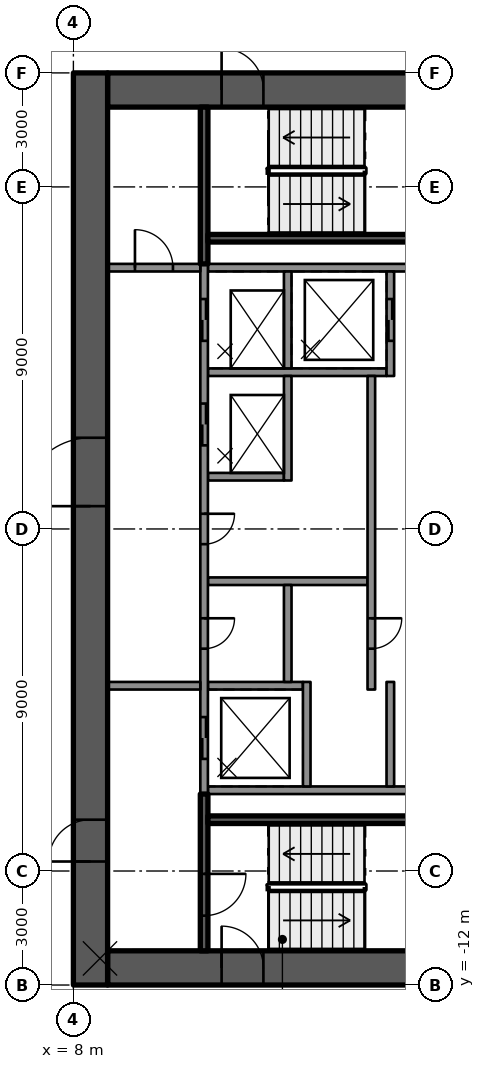
"""IFC4 building model, lengths in metres.
Left out: names, types, materials, properties, quantities, classifications, styles, units other than length and angle.
Written with IfcOpenShell. Run it as: python <this file> out.ifc"""

import sys

from ifc_helpers import new_model, si_unit, direction, frame, frame_2d, origin, place, context, subcontext, project, spatial, rectangle, extrude, element, fill, save


model = new_model("IFC4")
c1 = context("Model", 3, precision=1e-05, world=origin(), true_north=direction((0.0, 1.0)))
c2 = subcontext(c1, "Body", "Model", "MODEL_VIEW")
j1 = project(units=[si_unit("LENGTHUNIT", "METRE"), si_unit("PLANEANGLEUNIT", "RADIAN")], contexts=[c1])
p1 = place(None, origin())
s1 = spatial("IfcSite", under=j1, at=p1, CompositionType="ELEMENT")
p2 = place(p1, origin())
s2 = spatial("IfcBuilding", under=s1, at=p2, CompositionType="ELEMENT")
p3 = place(p2, frame((0.0, 0.0, 278.9)))
s3 = spatial("IfcBuildingStorey", under=s2, at=p3, CompositionType="ELEMENT", Elevation=278.9)
p4 = place(p3, frame((8.9, 11.55, 0.0), z_axis=(0.0, 0.0, 1.0), x_axis=(1.0, 0.0, 0.0)))
e1 = element("IfcWall", 1, at=p4, inside=s3, PredefinedType="SHEAR", context=c2, shape_type="SweptSolid", body=[
    extrude(rectangle(XDim=9.2, YDim=0.9, at=frame_2d((4.6, 0.0))), origin(), (0.0, 0.0, 1.0), 3.5),
])
p5 = place(p4, frame((3.0, 0.0, 0.0)))
e2 = element("IfcOpeningElement", 2, at=p5, cuts=e1, PredefinedType="OPENING", context=c2, shape_type="SweptSolid", body=[
    extrude(rectangle(XDim=1.1, YDim=2.1, at=frame_2d((0.55, 1.05))), frame((0.0, 0.46, 0.0), z_axis=(0.0, -1.0, 0.0), x_axis=(1.0, 0.0, 0.0)), (0.0, 0.0, 1.0), 0.92),
])
p6 = place(p3, frame((8.9, -11.55, 0.0), z_axis=(0.0, 0.0, 1.0), x_axis=(1.0, 0.0, 0.0)))
e3 = element("IfcWall", 3, at=p6, inside=s3, PredefinedType="SHEAR", context=c2, shape_type="SweptSolid", body=[
    extrude(rectangle(XDim=9.2, YDim=0.9, at=frame_2d((4.6, 0.0))), origin(), (0.0, 0.0, 1.0), 3.5),
])
p7 = place(p6, frame((3.0, 0.0, 0.0)))
e4 = element("IfcOpeningElement", 4, at=p7, cuts=e3, PredefinedType="OPENING", context=c2, shape_type="SweptSolid", body=[
    extrude(rectangle(XDim=1.1, YDim=2.1, at=frame_2d((0.55, 1.05))), frame((0.0, 0.46, 0.0), z_axis=(0.0, -1.0, 0.0), x_axis=(1.0, 0.0, 0.0)), (0.0, 0.0, 1.0), 0.92),
])
p8 = place(p3, frame((8.45, -12.0, 0.0), z_axis=(0.0, 0.0, 1.0), x_axis=(0.0, 1.0, 0.0)))
e5 = element("IfcWall", 5, at=p8, inside=s3, PredefinedType="SHEAR", context=c2, shape_type="SweptSolid", body=[
    extrude(rectangle(XDim=24.0, YDim=0.9, at=frame_2d((12.0, 0.0))), origin(), (0.0, 0.0, 1.0), 3.5),
])
p9 = place(p8, frame((12.6, 0.0, 0.0)))
e6 = element("IfcOpeningElement", 6, at=p9, cuts=e5, PredefinedType="OPENING", context=c2, shape_type="SweptSolid", body=[
    extrude(rectangle(XDim=1.8, YDim=2.1, at=frame_2d((0.9, 1.05))), frame((0.0, 0.46, 0.0), z_axis=(0.0, -1.0, 0.0), x_axis=(1.0, 0.0, 0.0)), (0.0, 0.0, 1.0), 0.92),
])
p10 = place(p8, frame((3.25, 0.0, 0.0)))
e7 = element("IfcOpeningElement", 7, at=p10, cuts=e5, PredefinedType="OPENING", context=c2, shape_type="SweptSolid", body=[
    extrude(rectangle(XDim=1.1, YDim=2.1, at=frame_2d((0.55, 1.05))), frame((0.0, 0.46, 0.0), z_axis=(0.0, -1.0, 0.0), x_axis=(1.0, 0.0, 0.0)), (0.0, 0.0, 1.0), 0.92),
])
for number, where, z_axis, x_axis in (
    (8, (11.54, -6.875, 0.0), (0.0, 0.0, 1.0), (1.0, 0.0, 0.0)),
    (9, (11.54, 6.875, 0.0), (0.0, 0.0, 1.0), (1.0, 0.0, 0.0)),
):
    element("IfcWall", number, at=place(p3, frame(where, z_axis=z_axis, x_axis=x_axis)), inside=s3, PredefinedType="SOLIDWALL", context=c2, shape_type="SweptSolid", body=[
        extrude(rectangle(XDim=6.56, YDim=0.2, at=frame_2d((3.28, 0.0))), origin(), (0.0, 0.0, 1.0), 3.09),
    ])
p11 = place(p3, frame((11.54, 4.125, 0.0), z_axis=(0.0, 0.0, 1.0), x_axis=(1.0, 0.0, 0.0)))
e10 = element("IfcWall", 10, at=p11, inside=s3, PredefinedType="SOLIDWALL", context=c2, shape_type="SweptSolid", body=[
    extrude(rectangle(XDim=4.7, YDim=0.2, at=frame_2d((2.35, 0.0))), origin(), (0.0, 0.0, 1.0), 3.09),
])
p12 = place(p3, frame((11.54, 1.375, 0.0), z_axis=(0.0, 0.0, 1.0), x_axis=(1.0, 0.0, 0.0)))
e11 = element("IfcWall", 11, at=p12, inside=s3, PredefinedType="SOLIDWALL", context=c2, shape_type="SweptSolid", body=[
    extrude(rectangle(XDim=2.0, YDim=0.2, at=frame_2d((1.0, 0.0))), origin(), (0.0, 0.0, 1.0), 3.09),
])
p13 = place(p3, frame((11.54, -1.375, 0.0), z_axis=(0.0, 0.0, 1.0), x_axis=(1.0, 0.0, 0.0)))
e12 = element("IfcWall", 12, at=p13, inside=s3, PredefinedType="SOLIDWALL", context=c2, shape_type="SweptSolid", body=[
    extrude(rectangle(XDim=4.2, YDim=0.2, at=frame_2d((2.1, 0.0))), origin(), (0.0, 0.0, 1.0), 3.09),
])
p14 = place(p3, frame((11.54, -4.125, 0.0), z_axis=(0.0, 0.0, 1.0), x_axis=(1.0, 0.0, 0.0)))
e13 = element("IfcWall", 13, at=p14, inside=s3, PredefinedType="SOLIDWALL", context=c2, shape_type="SweptSolid", body=[
    extrude(rectangle(XDim=2.5, YDim=0.2, at=frame_2d((1.25, 0.0))), origin(), (0.0, 0.0, 1.0), 3.09),
])
p15 = place(p3, frame((11.44, 6.975, 0.0), z_axis=(0.0, 0.0, 1.0), x_axis=(0.0, -1.0, 0.0)))
e14 = element("IfcWall", 14, at=p15, inside=s3, PredefinedType="SOLIDWALL", context=c2, shape_type="SweptSolid", body=[
    extrude(rectangle(XDim=13.95, YDim=0.2, at=frame_2d((6.975, 0.0))), origin(), (0.0, 0.0, 1.0), 3.09),
])
p16 = place(p15, frame((0.925, 0.0, 0.0)))
e15 = element("IfcOpeningElement", 15, at=p16, cuts=e14, PredefinedType="OPENING", context=c2, shape_type="SweptSolid", body=[
    extrude(rectangle(XDim=1.1, YDim=2.1, at=frame_2d((0.55, 1.05))), frame((0.0, 0.11, 0.0), z_axis=(0.0, -1.0, 0.0), x_axis=(1.0, 0.0, 0.0)), (0.0, 0.0, 1.0), 0.22),
])
p17 = place(p15, frame((3.675, 0.0, 0.0)))
e16 = element("IfcOpeningElement", 16, at=p17, cuts=e14, PredefinedType="OPENING", context=c2, shape_type="SweptSolid", body=[
    extrude(rectangle(XDim=1.1, YDim=2.1, at=frame_2d((0.55, 1.05))), frame((0.0, 0.11, 0.0), z_axis=(0.0, -1.0, 0.0), x_axis=(1.0, 0.0, 0.0)), (0.0, 0.0, 1.0), 0.22),
])
p18 = place(p15, frame((11.925, 0.0, 0.0)))
e17 = element("IfcOpeningElement", 17, at=p18, cuts=e14, PredefinedType="OPENING", context=c2, shape_type="SweptSolid", body=[
    extrude(rectangle(XDim=1.1, YDim=2.1, at=frame_2d((0.55, 1.05))), frame((0.0, 0.11, 0.0), z_axis=(0.0, -1.0, 0.0), x_axis=(1.0, 0.0, 0.0)), (0.0, 0.0, 1.0), 0.22),
])
p19 = place(p15, frame((6.575, 0.0, 0.0)))
e18 = element("IfcOpeningElement", 18, at=p19, cuts=e14, PredefinedType="OPENING", context=c2, shape_type="SweptSolid", body=[
    extrude(rectangle(XDim=0.8, YDim=2.1, at=frame_2d((0.4, 1.05))), frame((0.0, 0.11, 0.0), z_axis=(0.0, -1.0, 0.0), x_axis=(1.0, 0.0, 0.0)), (0.0, 0.0, 1.0), 0.22),
])
p20 = place(p15, frame((9.325, 0.0, 0.0)))
e19 = element("IfcOpeningElement", 19, at=p20, cuts=e14, PredefinedType="OPENING", context=c2, shape_type="SweptSolid", body=[
    extrude(rectangle(XDim=0.8, YDim=2.1, at=frame_2d((0.4, 1.05))), frame((0.0, 0.11, 0.0), z_axis=(0.0, -1.0, 0.0), x_axis=(1.0, 0.0, 0.0)), (0.0, 0.0, 1.0), 0.22),
])
p21 = place(p3, frame((13.64, 6.775, 0.0), z_axis=(0.0, 0.0, 1.0), x_axis=(0.0, -1.0, 0.0)))
e20 = element("IfcWall", 20, at=p21, inside=s3, PredefinedType="SOLIDWALL", context=c2, shape_type="SweptSolid", body=[
    extrude(rectangle(XDim=2.55, YDim=0.2, at=frame_2d((1.275, 0.0))), origin(), (0.0, 0.0, 1.0), 3.09),
])
p22 = place(p3, frame((13.64, 4.025, 0.0), z_axis=(0.0, 0.0, 1.0), x_axis=(0.0, -1.0, 0.0)))
e21 = element("IfcWall", 21, at=p22, inside=s3, PredefinedType="SOLIDWALL", context=c2, shape_type="SweptSolid", body=[
    extrude(rectangle(XDim=2.75, YDim=0.2, at=frame_2d((1.375, 0.0))), origin(), (0.0, 0.0, 1.0), 3.09),
])
p23 = place(p3, frame((13.64, -1.475, 0.0), z_axis=(0.0, 0.0, 1.0), x_axis=(0.0, -1.0, 0.0)))
e22 = element("IfcWall", 22, at=p23, inside=s3, PredefinedType="SOLIDWALL", context=c2, shape_type="SweptSolid", body=[
    extrude(rectangle(XDim=2.55, YDim=0.2, at=frame_2d((1.275, 0.0))), origin(), (0.0, 0.0, 1.0), 3.09),
])
p24 = place(p3, frame((14.14, -4.025, 0.0), z_axis=(0.0, 0.0, 1.0), x_axis=(0.0, -1.0, 0.0)))
e23 = element("IfcWall", 23, at=p24, inside=s3, PredefinedType="SOLIDWALL", context=c2, shape_type="SweptSolid", body=[
    extrude(rectangle(XDim=2.75, YDim=0.2, at=frame_2d((1.375, 0.0))), origin(), (0.0, 0.0, 1.0), 3.09),
])
p25 = place(p3, frame((16.34, 6.775, 0.0), z_axis=(0.0, 0.0, 1.0), x_axis=(0.0, -1.0, 0.0)))
e24 = element("IfcWall", 24, at=p25, inside=s3, PredefinedType="SOLIDWALL", context=c2, shape_type="SweptSolid", body=[
    extrude(rectangle(XDim=2.75, YDim=0.2, at=frame_2d((1.375, 0.0))), origin(), (0.0, 0.0, 1.0), 3.09),
])
p26 = place(p25, frame((0.725, 0.0, 0.0)))
e25 = element("IfcOpeningElement", 25, at=p26, cuts=e24, PredefinedType="OPENING", context=c2, shape_type="SweptSolid", body=[
    extrude(rectangle(XDim=1.1, YDim=2.1, at=frame_2d((0.55, 1.05))), frame((0.0, 0.11, 0.0), z_axis=(0.0, -1.0, 0.0), x_axis=(1.0, 0.0, 0.0)), (0.0, 0.0, 1.0), 0.22),
])
p27 = place(p3, frame((15.84, 4.025, 0.0), z_axis=(0.0, 0.0, 1.0), x_axis=(0.0, -1.0, 0.0)))
e26 = element("IfcWall", 26, at=p27, inside=s3, PredefinedType="SOLIDWALL", context=c2, shape_type="SweptSolid", body=[
    extrude(rectangle(XDim=8.25, YDim=0.2, at=frame_2d((4.125, 0.0))), origin(), (0.0, 0.0, 1.0), 3.09),
])
p28 = place(p27, frame((6.375, 0.0, 0.0)))
e27 = element("IfcOpeningElement", 27, at=p28, cuts=e26, PredefinedType="OPENING", context=c2, shape_type="SweptSolid", body=[
    extrude(rectangle(XDim=0.8, YDim=2.1, at=frame_2d((0.4, 1.05))), frame((0.0, 0.11, 0.0), z_axis=(0.0, -1.0, 0.0), x_axis=(1.0, 0.0, 0.0)), (0.0, 0.0, 1.0), 0.22),
])
p29 = place(p3, frame((16.34, -4.025, 0.0), z_axis=(0.0, 0.0, 1.0), x_axis=(0.0, -1.0, 0.0)))
e28 = element("IfcWall", 28, at=p29, inside=s3, PredefinedType="SOLIDWALL", context=c2, shape_type="SweptSolid", body=[
    extrude(rectangle(XDim=2.75, YDim=0.2, at=frame_2d((1.375, 0.0))), origin(), (0.0, 0.0, 1.0), 3.09),
])
p30 = place(p3, frame((11.44, -6.975, 0.0), z_axis=(0.0, 0.0, 1.0), x_axis=(0.0, -1.0, 0.0)))
e29 = element("IfcWall", 29, at=p30, inside=s3, PredefinedType="SOLIDWALL", context=c2, shape_type="SweptSolid", body=[
    extrude(rectangle(XDim=4.125, YDim=0.2, at=frame_2d((2.062, 0.0))), origin(), (0.0, 0.0, 1.0), 3.09),
])
p31 = place(p30, frame((2.1, 0.0, 0.0)))
e30 = element("IfcOpeningElement", 30, at=p31, cuts=e29, PredefinedType="OPENING", context=c2, shape_type="SweptSolid", body=[
    extrude(rectangle(XDim=1.1, YDim=2.1, at=frame_2d((0.55, 1.05))), frame((0.0, 0.11, 0.0), z_axis=(0.0, -1.0, 0.0), x_axis=(1.0, 0.0, 0.0)), (0.0, 0.0, 1.0), 0.22),
])
p32 = place(p3, frame((11.54, -7.65, 0.0), z_axis=(0.0, 0.0, 1.0), x_axis=(1.0, 0.0, 0.0)))
e31 = element("IfcWall", 31, at=p32, inside=s3, PredefinedType="SOLIDWALL", context=c2, shape_type="SweptSolid", body=[
    extrude(rectangle(XDim=6.56, YDim=0.2, at=frame_2d((3.28, 0.0))), origin(), (0.0, 0.0, 1.0), 3.09),
])
p33 = place(p3, frame((11.44, 11.1, 0.0), z_axis=(0.0, 0.0, 1.0), x_axis=(0.0, -1.0, 0.0)))
e32 = element("IfcWall", 32, at=p33, inside=s3, PredefinedType="SOLIDWALL", context=c2, shape_type="SweptSolid", body=[
    extrude(rectangle(XDim=4.125, YDim=0.2, at=frame_2d((2.062, 0.0))), origin(), (0.0, 0.0, 1.0), 3.09),
])
p34 = place(p3, frame((11.54, 7.65, 0.0), z_axis=(0.0, 0.0, 1.0), x_axis=(1.0, 0.0, 0.0)))
e33 = element("IfcWall", 33, at=p34, inside=s3, PredefinedType="SOLIDWALL", context=c2, shape_type="SweptSolid", body=[
    extrude(rectangle(XDim=6.56, YDim=0.2, at=frame_2d((3.28, 0.0))), origin(), (0.0, 0.0, 1.0), 3.09),
])
p35 = place(p3, frame((8.9, -4.125, 0.0), z_axis=(0.0, 0.0, 1.0), x_axis=(1.0, 0.0, 0.0)))
e34 = element("IfcWall", 34, at=p35, inside=s3, PredefinedType="PARTITIONING", context=c2, shape_type="SweptSolid", body=[
    extrude(rectangle(XDim=2.44, YDim=0.2, at=frame_2d((1.22, 0.0))), origin(), (0.0, 0.0, 1.0), 3.09),
])
p36 = place(p3, frame((8.9, 6.875, 0.0), z_axis=(0.0, 0.0, 1.0), x_axis=(1.0, 0.0, 0.0)))
e35 = element("IfcWall", 35, at=p36, inside=s3, PredefinedType="PARTITIONING", context=c2, shape_type="SweptSolid", body=[
    extrude(rectangle(XDim=2.44, YDim=0.2, at=frame_2d((1.22, 0.0))), origin(), (0.0, 0.0, 1.0), 3.09),
])
p37 = place(p36, frame((0.72, 0.0, 0.0)))
e36 = element("IfcOpeningElement", 36, at=p37, cuts=e35, PredefinedType="OPENING", context=c2, shape_type="SweptSolid", body=[
    extrude(rectangle(XDim=1.0, YDim=2.1, at=frame_2d((0.5, 1.05))), frame((0.0, 0.11, 0.0), z_axis=(0.0, -1.0, 0.0), x_axis=(1.0, 0.0, 0.0)), (0.0, 0.0, 1.0), 0.22),
])
p38 = place(p16, origin())
e37 = element("IfcDoor", 37, at=p38, inside=s3, OperationType="DOUBLE_DOOR_SLIDING", PredefinedType="DOOR", context=c2, shape_type="SweptSolid", body=[
    extrude(rectangle(XDim=1.1, YDim=2.1, at=frame_2d((0.55, 1.05))), frame((0.0, 0.025, 0.0), z_axis=(0.0, -1.0, 0.0), x_axis=(1.0, 0.0, 0.0)), (0.0, 0.0, 1.0), 0.05),
])
fill(e15, e37)
p39 = place(p26, origin())
e38 = element("IfcDoor", 38, at=p39, inside=s3, OperationType="DOUBLE_DOOR_SLIDING", PredefinedType="DOOR", context=c2, shape_type="SweptSolid", body=[
    extrude(rectangle(XDim=1.1, YDim=2.1, at=frame_2d((0.55, 1.05))), frame((0.0, 0.025, 0.0), z_axis=(0.0, -1.0, 0.0), x_axis=(1.0, 0.0, 0.0)), (0.0, 0.0, 1.0), 0.05),
])
fill(e25, e38)
p40 = place(p17, origin())
e39 = element("IfcDoor", 39, at=p40, inside=s3, OperationType="DOUBLE_DOOR_SLIDING", PredefinedType="DOOR", context=c2, shape_type="SweptSolid", body=[
    extrude(rectangle(XDim=1.1, YDim=2.1, at=frame_2d((0.55, 1.05))), frame((0.0, 0.025, 0.0), z_axis=(0.0, -1.0, 0.0), x_axis=(1.0, 0.0, 0.0)), (0.0, 0.0, 1.0), 0.05),
])
fill(e16, e39)
p41 = place(p18, origin())
e40 = element("IfcDoor", 40, at=p41, inside=s3, OperationType="DOUBLE_DOOR_SLIDING", PredefinedType="DOOR", context=c2, shape_type="SweptSolid", body=[
    extrude(rectangle(XDim=1.1, YDim=2.1, at=frame_2d((0.55, 1.05))), frame((0.0, 0.025, 0.0), z_axis=(0.0, -1.0, 0.0), x_axis=(1.0, 0.0, 0.0)), (0.0, 0.0, 1.0), 0.05),
])
fill(e17, e40)
p42 = place(p19, origin())
e41 = element("IfcDoor", 41, at=p42, inside=s3, OperationType="SINGLE_SWING_RIGHT", PredefinedType="DOOR", context=c2, shape_type="SweptSolid", body=[
    extrude(rectangle(XDim=0.8, YDim=2.1, at=frame_2d((0.4, 1.05))), frame((0.0, 0.025, 0.0), z_axis=(0.0, -1.0, 0.0), x_axis=(1.0, 0.0, 0.0)), (0.0, 0.0, 1.0), 0.05),
])
fill(e18, e41)
p43 = place(p20, origin())
e42 = element("IfcDoor", 42, at=p43, inside=s3, OperationType="SINGLE_SWING_LEFT", PredefinedType="DOOR", context=c2, shape_type="SweptSolid", body=[
    extrude(rectangle(XDim=0.8, YDim=2.1, at=frame_2d((0.4, 1.05))), frame((0.0, 0.025, 0.0), z_axis=(0.0, -1.0, 0.0), x_axis=(1.0, 0.0, 0.0)), (0.0, 0.0, 1.0), 0.05),
])
fill(e19, e42)
p44 = place(p28, origin())
e43 = element("IfcDoor", 43, at=p44, inside=s3, OperationType="SINGLE_SWING_LEFT", PredefinedType="DOOR", context=c2, shape_type="SweptSolid", body=[
    extrude(rectangle(XDim=0.8, YDim=2.1, at=frame_2d((0.4, 1.05))), frame((0.0, 0.025, 0.0), z_axis=(0.0, -1.0, 0.0), x_axis=(1.0, 0.0, 0.0)), (0.0, 0.0, 1.0), 0.05),
])
fill(e27, e43)
p45 = place(p9, origin())
e44 = element("IfcDoor", 44, at=p45, inside=s3, OperationType="SINGLE_SWING_RIGHT", PredefinedType="DOOR", context=c2, shape_type="SweptSolid", body=[
    extrude(rectangle(XDim=1.8, YDim=2.1, at=frame_2d((0.9, 1.05))), frame((0.0, 0.025, 0.0), z_axis=(0.0, -1.0, 0.0), x_axis=(1.0, 0.0, 0.0)), (0.0, 0.0, 1.0), 0.05),
])
fill(e6, e44)
p46 = place(p10, origin())
e45 = element("IfcDoor", 45, at=p46, inside=s3, OperationType="SINGLE_SWING_LEFT", PredefinedType="DOOR", context=c2, shape_type="SweptSolid", body=[
    extrude(rectangle(XDim=1.1, YDim=2.1, at=frame_2d((0.55, 1.05))), frame((0.0, 0.025, 0.0), z_axis=(0.0, -1.0, 0.0), x_axis=(1.0, 0.0, 0.0)), (0.0, 0.0, 1.0), 0.05),
])
fill(e7, e45)
p47 = place(p7, origin())
e46 = element("IfcDoor", 46, at=p47, inside=s3, OperationType="SINGLE_SWING_LEFT", PredefinedType="DOOR", context=c2, shape_type="SweptSolid", body=[
    extrude(rectangle(XDim=1.1, YDim=2.1, at=frame_2d((0.55, 1.05))), frame((0.0, 0.025, 0.0), z_axis=(0.0, -1.0, 0.0), x_axis=(1.0, 0.0, 0.0)), (0.0, 0.0, 1.0), 0.05),
])
fill(e4, e46)
p48 = place(p5, origin())
e47 = element("IfcDoor", 47, at=p48, inside=s3, OperationType="SINGLE_SWING_LEFT", PredefinedType="DOOR", context=c2, shape_type="SweptSolid", body=[
    extrude(rectangle(XDim=1.1, YDim=2.1, at=frame_2d((0.55, 1.05))), frame((0.0, 0.025, 0.0), z_axis=(0.0, -1.0, 0.0), x_axis=(1.0, 0.0, 0.0)), (0.0, 0.0, 1.0), 0.05),
])
fill(e2, e47)
p49 = place(p31, origin())
e48 = element("IfcDoor", 48, at=p49, inside=s3, OperationType="SINGLE_SWING_RIGHT", PredefinedType="DOOR", context=c2, shape_type="SweptSolid", body=[
    extrude(rectangle(XDim=1.1, YDim=2.1, at=frame_2d((0.55, 1.05))), frame((0.0, 0.025, 0.0), z_axis=(0.0, -1.0, 0.0), x_axis=(1.0, 0.0, 0.0)), (0.0, 0.0, 1.0), 0.05),
])
fill(e30, e48)
p50 = place(p37, origin())
e49 = element("IfcDoor", 49, at=p50, inside=s3, OperationType="SINGLE_SWING_RIGHT", PredefinedType="DOOR", context=c2, shape_type="SweptSolid", body=[
    extrude(rectangle(XDim=1.0, YDim=2.1, at=frame_2d((0.5, 1.05))), frame((0.0, 0.025, 0.0), z_axis=(0.0, -1.0, 0.0), x_axis=(1.0, 0.0, 0.0)), (0.0, 0.0, 1.0), 0.05),
])
fill(e36, e49)
save(model, sys.argv[1])
